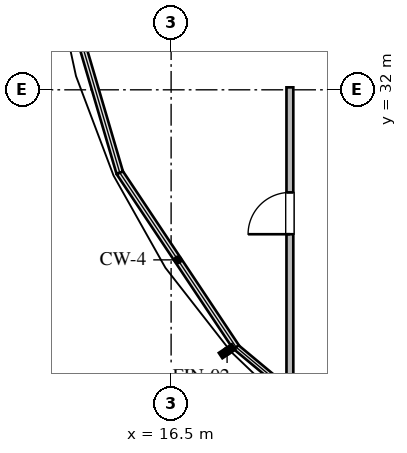
"""IFC4 building model, lengths in metres.
Left out: names, types, materials, properties, quantities, classifications, styles, units other than length and angle.
Written with IfcOpenShell. Run it as: python <this file> out.ifc"""

import sys

from ifc_helpers import new_model, si_unit, direction, frame, frame_2d, origin, place, context, subcontext, project, spatial, rectangle, extrude, element, fill, save


model = new_model("IFC4")
c1 = context("Model", 3, precision=1e-05, world=origin(), true_north=direction((0.0, 1.0)))
c2 = subcontext(c1, "Body", "Model", "MODEL_VIEW")
j1 = project(units=[si_unit("LENGTHUNIT", "METRE"), si_unit("PLANEANGLEUNIT", "RADIAN")], contexts=[c1])
p1 = place(None, origin())
s1 = spatial("IfcSite", under=j1, at=p1, CompositionType="ELEMENT")
p2 = place(p1, origin())
s2 = spatial("IfcBuilding", under=s1, at=p2, CompositionType="ELEMENT")
p3 = place(p2, frame((0.0, 0.0, 246.0)))
s3 = spatial("IfcBuildingStorey", under=s2, at=p3, CompositionType="ELEMENT", Elevation=246.0)
p4 = place(p3, frame((19.625, 24.06, 0.0), z_axis=(0.0, 0.0, 1.0), x_axis=(0.0, 1.0, 0.0)))
e1 = element("IfcWall", 1, at=p4, inside=s3, PredefinedType="PARTITIONING", context=c2, shape_type="SweptSolid", body=[
    extrude(rectangle(XDim=8.005, YDim=0.18, at=frame_2d((4.002, 0.0))), origin(), (0.0, 0.0, 1.0), 2.817),
])
p5 = place(p4, frame((4.14, 0.0, 0.0)))
e2 = element("IfcOpeningElement", 2, at=p5, cuts=e1, PredefinedType="OPENING", context=c2, shape_type="SweptSolid", body=[
    extrude(rectangle(XDim=1.1, YDim=2.1, at=frame_2d((0.55, 1.05))), frame((0.0, 0.1, 0.0), z_axis=(0.0, -1.0, 0.0), x_axis=(1.0, 0.0, 0.0)), (0.0, 0.0, 1.0), 0.2),
])
p6 = place(p5, origin())
e3 = element("IfcDoor", 3, at=p6, inside=s3, OperationType="SINGLE_SWING_LEFT", PredefinedType="DOOR", context=c2, shape_type="SweptSolid", body=[
    extrude(rectangle(XDim=1.1, YDim=2.1, at=frame_2d((0.55, 1.05))), frame((0.0, 0.025, 0.0), z_axis=(0.0, -1.0, 0.0), x_axis=(1.0, 0.0, 0.0)), (0.0, 0.0, 1.0), 0.05),
])
fill(e2, e3)
save(model, sys.argv[1])
